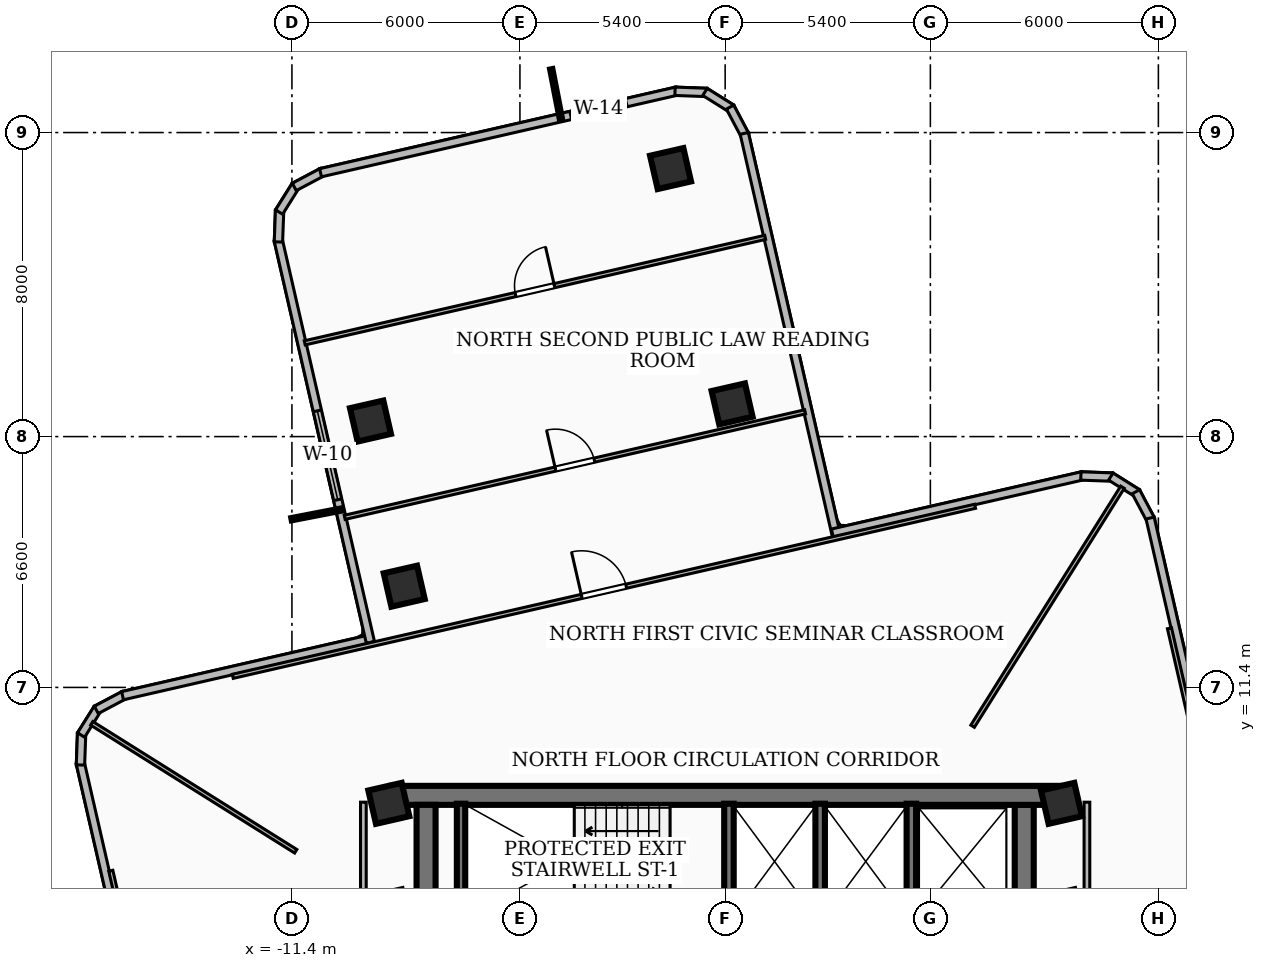
"""IFC4 building model, lengths in metres.
Left out: names, types, materials, properties, quantities, classifications, styles, units other than length and angle.
Written with IfcOpenShell. Run it as: python <this file> out.ifc"""

import sys

from ifc_helpers import new_model, si_unit, direction, frame, frame_2d, origin, origin_2d, place, context, subcontext, project, spatial, rectangle, extrude, element, fill, save


model = new_model("IFC4")
c1 = context("Model", 3, precision=1e-05, world=origin(), true_north=direction((0.0, 1.0)))
c2 = subcontext(c1, "Body", "Model", "MODEL_VIEW")
j1 = project(units=[si_unit("LENGTHUNIT", "METRE"), si_unit("PLANEANGLEUNIT", "RADIAN")], contexts=[c1])
p1 = place(None, origin())
s1 = spatial("IfcSite", under=j1, at=p1, CompositionType="ELEMENT")
p2 = place(p1, origin())
s2 = spatial("IfcBuilding", under=s1, at=p2, CompositionType="ELEMENT")
p3 = place(p2, frame((0.0, 0.0, 123.48)))
s3 = spatial("IfcBuildingStorey", under=s2, at=p3, CompositionType="ELEMENT", Elevation=123.48)
p4 = place(p3, frame((-8.78, 8.56, 0.0), z_axis=(0.0, 0.0, 1.0), x_axis=(1.0, 0.0, 0.0)))
e1 = element("IfcWall", 1, at=p4, inside=s3, PredefinedType="SHEAR", context=c2, shape_type="SweptSolid", body=[
    extrude(rectangle(XDim=17.56, YDim=0.5, at=frame_2d((8.78, 0.0))), origin(), (0.0, 0.0, 1.0), 3.34),
])
for number, where, z_axis, x_axis in (
    (2, (-7.87, 2.0, 0.0), (0.0, 0.0, 1.0), (0.0, 1.0, 0.0)),
    (3, (7.87, 8.31, 0.0), (0.0, 0.0, 1.0), (0.0, -1.0, 0.0)),
):
    element("IfcWall", number, at=place(p3, frame(where, z_axis=z_axis, x_axis=x_axis)), inside=s3, PredefinedType="SHEAR", context=c2, shape_type="SweptSolid", body=[
        extrude(rectangle(XDim=6.31, YDim=0.5, at=frame_2d((3.155, 0.0))), origin(), (0.0, 0.0, 1.0), 3.34),
    ])
p5 = place(p3, frame((-6.95, 5.28, 0.0), z_axis=(0.0, 0.0, 1.0), x_axis=(0.0, 1.0, 0.0)))
e4 = element("IfcWall", 4, at=p5, inside=s3, PredefinedType="SOLIDWALL", context=c2, shape_type="SweptSolid", body=[
    extrude(rectangle(XDim=3.06, YDim=0.22, at=frame_2d((1.53, 0.0))), origin(), (0.0, 0.0, 1.0), 3.34),
])
for number, where, z_axis, x_axis in (
    (5, (0.1, 5.3, 0.0), (0.0, 0.0, 1.0), (0.0, 1.0, 0.0)),
    (6, (2.5, 5.3, 0.0), (0.0, 0.0, 1.0), (0.0, 1.0, 0.0)),
    (7, (4.9, 5.3, 0.0), (0.0, 0.0, 1.0), (0.0, 1.0, 0.0)),
):
    element("IfcWall", number, at=place(p3, frame(where, z_axis=z_axis, x_axis=x_axis)), inside=s3, PredefinedType="SOLIDWALL", context=c2, shape_type="SweptSolid", body=[
        extrude(rectangle(XDim=3.04, YDim=0.25, at=frame_2d((1.52, 0.0))), origin(), (0.0, 0.0, 1.0), 3.34),
    ])
for number, where, z_axis, x_axis in (
    (8, (-8.85, 8.35, 0.0), (0.0, 0.0, 1.0), (0.975, 0.223, 0.0)),
    (9, (8.85, 8.35, 0.0), (0.0, 0.0, 1.0), (0.975, 0.223, 0.0)),
    (10, (0.183, 18.86, 0.0), (0.0, 0.0, 1.0), (0.975, 0.223, 0.0)),
    (11, (-8.445, 14.064, 0.0), (0.0, 0.0, 1.0), (0.975, 0.223, 0.0)),
    (12, (-1.437, 25.052, 0.0), (0.0, 0.0, 1.0), (0.975, 0.223, 0.0)),
    (13, (-9.333, 18.409, 0.0), (0.0, 0.0, 1.0), (0.975, 0.223, 0.0)),
):
    element("IfcColumn", number, at=place(p3, frame(where, z_axis=z_axis, x_axis=x_axis)), inside=s3, PredefinedType="COLUMN", context=c2, shape_type="SweptSolid", body=[
        extrude(rectangle(XDim=0.9, YDim=0.9, at=origin_2d()), origin(), (0.0, 0.0, 1.0), 3.6),
    ])
p6 = place(p3, frame((-15.46, 2.821, 0.0), z_axis=(0.0, 0.0, 1.0), x_axis=(-0.223278912438, 0.974754598481, 0.0)))
e14 = element("IfcWall", 14, at=p6, inside=s3, PredefinedType="SOLIDWALL", context=c2, shape_type="SweptSolid", body=[
    extrude(rectangle(XDim=6.759, YDim=0.22, at=frame_2d((3.379, 0.0))), origin(), (0.0, 0.0, 1.0), 3.34),
])
p7 = place(p3, frame((-16.964, 9.36, 0.0), z_axis=(0.0, 0.0, 1.0), x_axis=(0.035983706773, 0.999352376715, 0.0)))
e15 = element("IfcWall", 15, at=p7, inside=s3, PredefinedType="SOLIDWALL", context=c2, shape_type="SweptSolid", body=[
    extrude(rectangle(XDim=0.834, YDim=0.22, at=frame_2d((0.417, 0.0))), origin(), (0.0, 0.0, 1.0), 3.34),
])
p8 = place(p3, frame((-16.948, 10.148, 0.0), z_axis=(0.0, 0.0, 1.0), x_axis=(0.531096868492, 0.847311109497, 0.0)))
e16 = element("IfcWall", 16, at=p8, inside=s3, PredefinedType="SOLIDWALL", context=c2, shape_type="SweptSolid", body=[
    extrude(rectangle(XDim=0.819, YDim=0.22, at=frame_2d((0.41, 0.0))), origin(), (0.0, 0.0, 1.0), 3.34),
])
p9 = place(p3, frame((-16.548, 10.809, 0.0), z_axis=(0.0, 0.0, 1.0), x_axis=(0.883460266876, 0.468506090516, 0.0)))
e17 = element("IfcWall", 17, at=p9, inside=s3, PredefinedType="SOLIDWALL", context=c2, shape_type="SweptSolid", body=[
    extrude(rectangle(XDim=0.834, YDim=0.22, at=frame_2d((0.417, 0.0))), origin(), (0.0, 0.0, 1.0), 3.34),
])
p10 = place(p3, frame((-15.857, 11.182, 0.0), z_axis=(0.0, 0.0, 1.0), x_axis=(0.974754598481, 0.223278912438, 0.0)))
e18 = element("IfcWall", 18, at=p10, inside=s3, PredefinedType="SOLIDWALL", context=c2, shape_type="SweptSolid", body=[
    extrude(rectangle(XDim=6.759, YDim=0.22, at=frame_2d((3.379, 0.0))), origin(), (0.0, 0.0, 1.0), 3.34),
])
p11 = place(p3, frame((-9.335, 12.585, 0.0), z_axis=(0.0, 0.0, 1.0), x_axis=(-0.22331741435, 0.974745778369, 0.0)))
e19 = element("IfcWall", 19, at=p11, inside=s3, PredefinedType="SOLIDWALL", context=c2, shape_type="SweptSolid", body=[
    extrude(rectangle(XDim=10.859, YDim=0.22, at=frame_2d((5.43, 0.0))), origin(), (0.0, 0.0, 1.0), 3.34),
])
p12 = place(p11, frame((3.85, 0.0, 0.85)))
e20 = element("IfcOpeningElement", 20, at=p12, cuts=e19, PredefinedType="OPENING", context=c2, shape_type="SweptSolid", body=[
    extrude(rectangle(XDim=2.4, YDim=1.65, at=frame_2d((1.2, 0.825))), frame((0.0, 0.12, 0.0), z_axis=(0.0, -1.0, 0.0), x_axis=(1.0, 0.0, 0.0)), (0.0, 0.0, 1.0), 0.24),
])
p13 = place(p3, frame((-11.755, 23.121, 0.0), z_axis=(0.0, 0.0, 1.0), x_axis=(0.036903333482, 0.999318839999, 0.0)))
e21 = element("IfcWall", 21, at=p13, inside=s3, PredefinedType="SOLIDWALL", context=c2, shape_type="SweptSolid", body=[
    extrude(rectangle(XDim=0.833, YDim=0.22, at=frame_2d((0.417, 0.0))), origin(), (0.0, 0.0, 1.0), 3.34),
])
p14 = place(p3, frame((-11.738, 23.908, 0.0), z_axis=(0.0, 0.0, 1.0), x_axis=(0.531096868492, 0.847311109497, 0.0)))
e22 = element("IfcWall", 22, at=p14, inside=s3, PredefinedType="SOLIDWALL", context=c2, shape_type="SweptSolid", body=[
    extrude(rectangle(XDim=0.819, YDim=0.22, at=frame_2d((0.41, 0.0))), origin(), (0.0, 0.0, 1.0), 3.34),
])
p15 = place(p3, frame((-11.338, 24.569, 0.0), z_axis=(0.0, 0.0, 1.0), x_axis=(0.883396009524, 0.468627240307, 0.0)))
e23 = element("IfcWall", 23, at=p15, inside=s3, PredefinedType="SOLIDWALL", context=c2, shape_type="SweptSolid", body=[
    extrude(rectangle(XDim=0.834, YDim=0.22, at=frame_2d((0.417, 0.0))), origin(), (0.0, 0.0, 1.0), 3.34),
])
p16 = place(p3, frame((-10.647, 24.942, 0.0), z_axis=(0.0, 0.0, 1.0), x_axis=(0.974725871537, 0.223404286793, 0.0)))
e24 = element("IfcWall", 24, at=p16, inside=s3, PredefinedType="SOLIDWALL", context=c2, shape_type="SweptSolid", body=[
    extrude(rectangle(XDim=9.62, YDim=0.22, at=frame_2d((4.81, 0.0))), origin(), (0.0, 0.0, 1.0), 3.34),
])
p17 = place(p16, frame((6.754, 0.0, 0.85)))
e25 = element("IfcOpeningElement", 25, at=p17, cuts=e24, PredefinedType="OPENING", context=c2, shape_type="SweptSolid", body=[
    extrude(rectangle(XDim=1.5, YDim=1.5, at=frame_2d((0.75, 0.75))), frame((0.0, 0.12, 0.0), z_axis=(0.0, -1.0, 0.0), x_axis=(1.0, 0.0, 0.0)), (0.0, 0.0, 1.0), 0.24),
])
p18 = place(p3, frame((-1.319, 27.086, 0.0), z_axis=(0.0, 0.0, 1.0), x_axis=(0.999309614288, -0.037152318798, 0.0)))
e26 = element("IfcWall", 26, at=p18, inside=s3, PredefinedType="SOLIDWALL", context=c2, shape_type="SweptSolid", body=[
    extrude(rectangle(XDim=0.834, YDim=0.22, at=frame_2d((0.417, 0.0))), origin(), (0.0, 0.0, 1.0), 3.34),
])
p19 = place(p3, frame((-0.531, 27.069, 0.0), z_axis=(0.0, 0.0, 1.0), x_axis=(0.847311109497, -0.531096868492, 0.0)))
e27 = element("IfcWall", 27, at=p19, inside=s3, PredefinedType="SOLIDWALL", context=c2, shape_type="SweptSolid", body=[
    extrude(rectangle(XDim=0.819, YDim=0.22, at=frame_2d((0.41, 0.0))), origin(), (0.0, 0.0, 1.0), 3.34),
])
p20 = place(p3, frame((0.13, 26.669, 0.0), z_axis=(0.0, 0.0, 1.0), x_axis=(0.468734444521, -0.883339131092, 0.0)))
e28 = element("IfcWall", 28, at=p20, inside=s3, PredefinedType="SOLIDWALL", context=c2, shape_type="SweptSolid", body=[
    extrude(rectangle(XDim=0.834, YDim=0.22, at=frame_2d((0.417, 0.0))), origin(), (0.0, 0.0, 1.0), 3.34),
])
p21 = place(p3, frame((0.503, 25.978, 0.0), z_axis=(0.0, 0.0, 1.0), x_axis=(0.223251537739, -0.974760868571, 0.0)))
e29 = element("IfcWall", 29, at=p21, inside=s3, PredefinedType="SOLIDWALL", context=c2, shape_type="SweptSolid", body=[
    extrude(rectangle(XDim=10.858, YDim=0.22, at=frame_2d((5.429, 0.0))), origin(), (0.0, 0.0, 1.0), 2.57),
])
p22 = place(p3, frame((2.821, 15.46, 0.0), z_axis=(0.0, 0.0, 1.0), x_axis=(0.974754598481, 0.223278912438, 0.0)))
e30 = element("IfcWall", 30, at=p22, inside=s3, PredefinedType="SOLIDWALL", context=c2, shape_type="SweptSolid", body=[
    extrude(rectangle(XDim=6.759, YDim=0.22, at=frame_2d((3.379, 0.0))), origin(), (0.0, 0.0, 1.0), 2.57),
])
p23 = place(p3, frame((9.36, 16.964, 0.0), z_axis=(0.0, 0.0, 1.0), x_axis=(0.999352376715, -0.035983706773, 0.0)))
e31 = element("IfcWall", 31, at=p23, inside=s3, PredefinedType="SOLIDWALL", context=c2, shape_type="SweptSolid", body=[
    extrude(rectangle(XDim=0.834, YDim=0.22, at=frame_2d((0.417, 0.0))), origin(), (0.0, 0.0, 1.0), 3.34),
])
p24 = place(p3, frame((10.148, 16.948, 0.0), z_axis=(0.0, 0.0, 1.0), x_axis=(0.847311109497, -0.531096868492, 0.0)))
e32 = element("IfcWall", 32, at=p24, inside=s3, PredefinedType="SOLIDWALL", context=c2, shape_type="SweptSolid", body=[
    extrude(rectangle(XDim=0.819, YDim=0.22, at=frame_2d((0.41, 0.0))), origin(), (0.0, 0.0, 1.0), 3.34),
])
p25 = place(p3, frame((10.809, 16.548, 0.0), z_axis=(0.0, 0.0, 1.0), x_axis=(0.468506090516, -0.883460266876, 0.0)))
e33 = element("IfcWall", 33, at=p25, inside=s3, PredefinedType="SOLIDWALL", context=c2, shape_type="SweptSolid", body=[
    extrude(rectangle(XDim=0.834, YDim=0.22, at=frame_2d((0.417, 0.0))), origin(), (0.0, 0.0, 1.0), 3.34),
])
p26 = place(p3, frame((11.182, 15.857, 0.0), z_axis=(0.0, 0.0, 1.0), x_axis=(0.223278912438, -0.974754598481, 0.0)))
e34 = element("IfcWall", 34, at=p26, inside=s3, PredefinedType="SOLIDWALL", context=c2, shape_type="SweptSolid", body=[
    extrude(rectangle(XDim=6.759, YDim=0.22, at=frame_2d((3.379, 0.0))), origin(), (0.0, 0.0, 1.0), 2.644),
])
for number, where, z_axis, x_axis in (
    (35, (-9.52, 1.75, 0.0), (0.0, 0.0, 1.0), (0.0, 1.0, 0.0)),
    (36, (9.52, 1.75, 0.0), (0.0, 0.0, 1.0), (0.0, 1.0, 0.0)),
):
    element("IfcWall", number, at=place(p3, frame(where, z_axis=z_axis, x_axis=x_axis)), inside=s3, PredefinedType="PARTITIONING", context=c2, shape_type="SweptSolid", body=[
        extrude(rectangle(XDim=6.63, YDim=0.15, at=frame_2d((3.315, 0.0))), origin(), (0.0, 0.0, 1.0), 2.57),
    ])
p27 = place(p3, frame((6.512, 10.38, 0.0), z_axis=(0.0, 0.0, 1.0), x_axis=(0.531323053356, 0.847169294163, 0.0)))
e37 = element("IfcWall", 37, at=p27, inside=s3, PredefinedType="PARTITIONING", context=c2, shape_type="SweptSolid", body=[
    extrude(rectangle(XDim=7.421, YDim=0.11, at=frame_2d((3.711, 0.0))), origin(), (0.0, 0.0, 1.0), 2.57),
])
p28 = place(p3, frame((-11.3, 7.089, 0.0), z_axis=(0.0, 0.0, 1.0), x_axis=(-0.847172398776, 0.531318103167, 0.0)))
e38 = element("IfcWall", 38, at=p28, inside=s3, PredefinedType="PARTITIONING", context=c2, shape_type="SweptSolid", body=[
    extrude(rectangle(XDim=6.335, YDim=0.11, at=frame_2d((3.167, 0.0))), origin(), (0.0, 0.0, 1.0), 3.34),
])
p29 = place(p3, frame((11.692, 12.957, 0.0), z_axis=(0.0, 0.0, 1.0), x_axis=(0.223262093598, -0.97475845088, 0.0)))
e39 = element("IfcWall", 39, at=p29, inside=s3, PredefinedType="PARTITIONING", context=c2, shape_type="SweptSolid", body=[
    extrude(rectangle(XDim=20.04, YDim=0.11, at=frame_2d((10.02, 0.0))), origin(), (0.0, 0.0, 1.0), 2.57),
])
p30 = place(p29, frame((9.42, 0.0, 0.0)))
e40 = element("IfcOpeningElement", 40, at=p30, cuts=e39, PredefinedType="OPENING", context=c2, shape_type="SweptSolid", body=[
    extrude(rectangle(XDim=1.2, YDim=2.1, at=frame_2d((0.6, 1.05))), frame((0.0, 0.065, 0.0), z_axis=(0.0, -1.0, 0.0), x_axis=(1.0, 0.0, 0.0)), (0.0, 0.0, 1.0), 0.13),
])
p31 = place(p3, frame((-12.957, 11.692, 0.0), z_axis=(0.0, 0.0, 1.0), x_axis=(0.97475845088, 0.223262093598, 0.0)))
e41 = element("IfcWall", 41, at=p31, inside=s3, PredefinedType="PARTITIONING", context=c2, shape_type="SweptSolid", body=[
    extrude(rectangle(XDim=20.04, YDim=0.11, at=frame_2d((10.02, 0.0))), origin(), (0.0, 0.0, 1.0), 2.57),
])
p32 = place(p31, frame((9.42, 0.0, 0.0)))
e42 = element("IfcOpeningElement", 42, at=p32, cuts=e41, PredefinedType="OPENING", context=c2, shape_type="SweptSolid", body=[
    extrude(rectangle(XDim=1.2, YDim=2.1, at=frame_2d((0.6, 1.05))), frame((0.0, 0.065, 0.0), z_axis=(0.0, -1.0, 0.0), x_axis=(1.0, 0.0, 0.0)), (0.0, 0.0, 1.0), 0.13),
])
p33 = place(p3, frame((-10.012, 15.875, 0.0), z_axis=(0.0, 0.0, 1.0), x_axis=(0.974744523099, 0.223322893337, 0.0)))
e43 = element("IfcWall", 43, at=p33, inside=s3, PredefinedType="PARTITIONING", context=c2, shape_type="SweptSolid", body=[
    extrude(rectangle(XDim=12.43, YDim=0.11, at=frame_2d((6.215, 0.0))), origin(), (0.0, 0.0, 1.0), 2.57),
])
p34 = place(p33, frame((5.69, 0.0, 0.0)))
e44 = element("IfcOpeningElement", 44, at=p34, cuts=e43, PredefinedType="OPENING", context=c2, shape_type="SweptSolid", body=[
    extrude(rectangle(XDim=1.05, YDim=2.08, at=frame_2d((0.525, 1.04))), frame((0.0, 0.065, 0.0), z_axis=(0.0, -1.0, 0.0), x_axis=(1.0, 0.0, 0.0)), (0.0, 0.0, 1.0), 0.13),
])
p35 = place(p3, frame((-11.063, 20.466, 0.0), z_axis=(0.0, 0.0, 1.0), x_axis=(0.974744523099, 0.223322893337, 0.0)))
e45 = element("IfcWall", 45, at=p35, inside=s3, PredefinedType="PARTITIONING", context=c2, shape_type="SweptSolid", body=[
    extrude(rectangle(XDim=12.43, YDim=0.11, at=frame_2d((6.215, 0.0))), origin(), (0.0, 0.0, 1.0), 2.57),
])
p36 = place(p35, frame((5.69, 0.0, 0.0)))
e46 = element("IfcOpeningElement", 46, at=p36, cuts=e45, PredefinedType="OPENING", context=c2, shape_type="SweptSolid", body=[
    extrude(rectangle(XDim=1.05, YDim=2.08, at=frame_2d((0.525, 1.04))), frame((0.0, 0.065, 0.0), z_axis=(0.0, -1.0, 0.0), x_axis=(1.0, 0.0, 0.0)), (0.0, 0.0, 1.0), 0.13),
])
p37 = place(p3, frame((-11.692, -12.957, 0.0), z_axis=(0.0, 0.0, 1.0), x_axis=(-0.223262093598, 0.97475845088, 0.0)))
e47 = element("IfcWall", 47, at=p37, inside=s3, PredefinedType="PARTITIONING", context=c2, shape_type="SweptSolid", body=[
    extrude(rectangle(XDim=20.04, YDim=0.11, at=frame_2d((10.02, 0.0))), origin(), (0.0, 0.0, 1.0), 2.57),
])
p38 = place(p37, frame((9.42, 0.0, 0.0)))
e48 = element("IfcOpeningElement", 48, at=p38, cuts=e47, PredefinedType="OPENING", context=c2, shape_type="SweptSolid", body=[
    extrude(rectangle(XDim=1.2, YDim=2.1, at=frame_2d((0.6, 1.05))), frame((0.0, 0.065, 0.0), z_axis=(0.0, -1.0, 0.0), x_axis=(1.0, 0.0, 0.0)), (0.0, 0.0, 1.0), 0.13),
])
p39 = place(p12, origin())
e49 = element("IfcWindow", 49, at=p39, inside=s3, PartitioningType="SINGLE_PANEL", PredefinedType="WINDOW", context=c2, shape_type="SweptSolid", body=[
    extrude(rectangle(XDim=2.4, YDim=1.65, at=frame_2d((1.2, 0.825))), frame((0.0, 0.03, 0.0), z_axis=(0.0, -1.0, 0.0), x_axis=(1.0, 0.0, 0.0)), (0.0, 0.0, 1.0), 0.06),
])
fill(e20, e49)
p40 = place(p17, origin())
e50 = element("IfcWindow", 50, at=p40, inside=s3, PartitioningType="SINGLE_PANEL", PredefinedType="WINDOW", context=c2, shape_type="SweptSolid", body=[
    extrude(rectangle(XDim=1.5, YDim=1.5, at=frame_2d((0.75, 0.75))), frame((0.0, 0.03, 0.0), z_axis=(0.0, -1.0, 0.0), x_axis=(1.0, 0.0, 0.0)), (0.0, 0.0, 1.0), 0.06),
])
fill(e25, e50)
p41 = place(p32, origin())
e51 = element("IfcDoor", 51, at=p41, inside=s3, OperationType="SINGLE_SWING_LEFT", PredefinedType="DOOR", context=c2, shape_type="SweptSolid", body=[
    extrude(rectangle(XDim=1.2, YDim=2.1, at=frame_2d((0.6, 1.05))), frame((0.0, 0.025, 0.0), z_axis=(0.0, -1.0, 0.0), x_axis=(1.0, 0.0, 0.0)), (0.0, 0.0, 1.0), 0.05),
])
fill(e42, e51)
p42 = place(p34, origin())
e52 = element("IfcDoor", 52, at=p42, inside=s3, OperationType="SINGLE_SWING_LEFT", PredefinedType="DOOR", context=c2, shape_type="SweptSolid", body=[
    extrude(rectangle(XDim=1.05, YDim=2.08, at=frame_2d((0.525, 1.04))), frame((0.0, 0.025, 0.0), z_axis=(0.0, -1.0, 0.0), x_axis=(1.0, 0.0, 0.0)), (0.0, 0.0, 1.0), 0.05),
])
fill(e44, e52)
p43 = place(p36, origin())
e53 = element("IfcDoor", 53, at=p43, inside=s3, OperationType="SINGLE_SWING_RIGHT", PredefinedType="DOOR", context=c2, shape_type="SweptSolid", body=[
    extrude(rectangle(XDim=1.05, YDim=2.08, at=frame_2d((0.525, 1.04))), frame((0.0, 0.025, 0.0), z_axis=(0.0, -1.0, 0.0), x_axis=(1.0, 0.0, 0.0)), (0.0, 0.0, 1.0), 0.05),
])
fill(e46, e53)
save(model, sys.argv[1])
